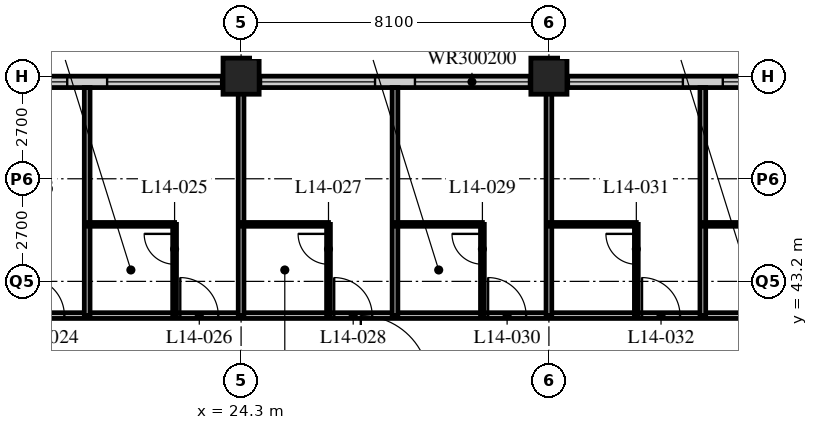
"""IFC4 building model, lengths in metres.
Left out: names, types, materials, properties, quantities, classifications, styles, units other than length and angle.
Written with IfcOpenShell. Run it as: python <this file> out.ifc"""

import sys

from ifc_helpers import new_model, si_unit, direction, frame, frame_2d, origin, origin_2d, place, context, subcontext, project, spatial, rectangle, hollow_rectangle, extrude, element, fill, save


model = new_model("IFC4")
c1 = context("Model", 3, precision=1e-05, world=origin(), true_north=direction((0.0, 1.0)))
c2 = subcontext(c1, "Body", "Model", "MODEL_VIEW")
j1 = project(units=[si_unit("LENGTHUNIT", "METRE"), si_unit("PLANEANGLEUNIT", "RADIAN")], contexts=[c1])
p1 = place(None, origin())
s1 = spatial("IfcSite", under=j1, at=p1, CompositionType="ELEMENT")
p2 = place(p1, origin())
s2 = spatial("IfcBuilding", under=s1, at=p2, CompositionType="ELEMENT")
p3 = place(p2, frame((0.0, 0.0, 60.2)))
s3 = spatial("IfcBuildingStorey", under=s2, at=p3, CompositionType="ELEMENT", Elevation=60.2)
for number, where, z_axis, x_axis in (
    (1, (24.3, 48.6, 0.0), (0.0, 0.0, 1.0), (1.0, 0.0, 0.0)),
    (2, (32.4, 48.6, 0.0), (0.0, 0.0, 1.0), (1.0, 0.0, 0.0)),
):
    element("IfcColumn", number, at=place(p3, frame(where, z_axis=z_axis, x_axis=x_axis)), inside=s3, PredefinedType="COLUMN", context=c2, shape_type="SweptSolid", body=[
        extrude(hollow_rectangle(XDim=0.95, YDim=0.95, WallThickness=0.095, at=origin_2d()), origin(), (0.0, 0.0, 1.0), 3.4),
    ])
p4 = place(p3, frame((48.3, 48.45, 0.0), z_axis=(0.0, 0.0, 1.0), x_axis=(-1.0, 0.0, 0.0)))
e3 = element("IfcWall", 3, at=p4, inside=s3, PredefinedType="SOLIDWALL", context=c2, shape_type="SweptSolid", body=[
    extrude(rectangle(XDim=40.2, YDim=0.3, at=frame_2d((20.1, 0.0))), origin(), (0.0, 0.0, 1.0), 3.19),
])
p5 = place(p4, frame((0.225, 0.0, 0.9)))
e4 = element("IfcOpeningElement", 4, at=p5, cuts=e3, PredefinedType="OPENING", context=c2, shape_type="SweptSolid", body=[
    extrude(rectangle(XDim=3.0, YDim=2.0, at=frame_2d((1.5, 1.0))), frame((0.0, 0.16, 0.0), z_axis=(0.0, -1.0, 0.0), x_axis=(1.0, 0.0, 0.0)), (0.0, 0.0, 1.0), 0.32),
])
p6 = place(p4, frame((4.275, 0.0, 0.9)))
e5 = element("IfcOpeningElement", 5, at=p6, cuts=e3, PredefinedType="OPENING", context=c2, shape_type="SweptSolid", body=[
    extrude(rectangle(XDim=3.0, YDim=2.0, at=frame_2d((1.5, 1.0))), frame((0.0, 0.16, 0.0), z_axis=(0.0, -1.0, 0.0), x_axis=(1.0, 0.0, 0.0)), (0.0, 0.0, 1.0), 0.32),
])
p7 = place(p4, frame((8.325, 0.0, 0.9)))
e6 = element("IfcOpeningElement", 6, at=p7, cuts=e3, PredefinedType="OPENING", context=c2, shape_type="SweptSolid", body=[
    extrude(rectangle(XDim=3.0, YDim=2.0, at=frame_2d((1.5, 1.0))), frame((0.0, 0.16, 0.0), z_axis=(0.0, -1.0, 0.0), x_axis=(1.0, 0.0, 0.0)), (0.0, 0.0, 1.0), 0.32),
])
p8 = place(p4, frame((12.375, 0.0, 0.9)))
e7 = element("IfcOpeningElement", 7, at=p8, cuts=e3, PredefinedType="OPENING", context=c2, shape_type="SweptSolid", body=[
    extrude(rectangle(XDim=3.0, YDim=2.0, at=frame_2d((1.5, 1.0))), frame((0.0, 0.16, 0.0), z_axis=(0.0, -1.0, 0.0), x_axis=(1.0, 0.0, 0.0)), (0.0, 0.0, 1.0), 0.32),
])
p9 = place(p4, frame((16.425, 0.0, 0.9)))
e8 = element("IfcOpeningElement", 8, at=p9, cuts=e3, PredefinedType="OPENING", context=c2, shape_type="SweptSolid", body=[
    extrude(rectangle(XDim=3.0, YDim=2.0, at=frame_2d((1.5, 1.0))), frame((0.0, 0.16, 0.0), z_axis=(0.0, -1.0, 0.0), x_axis=(1.0, 0.0, 0.0)), (0.0, 0.0, 1.0), 0.32),
])
p10 = place(p4, frame((20.475, 0.0, 0.9)))
e9 = element("IfcOpeningElement", 9, at=p10, cuts=e3, PredefinedType="OPENING", context=c2, shape_type="SweptSolid", body=[
    extrude(rectangle(XDim=3.0, YDim=2.0, at=frame_2d((1.5, 1.0))), frame((0.0, 0.16, 0.0), z_axis=(0.0, -1.0, 0.0), x_axis=(1.0, 0.0, 0.0)), (0.0, 0.0, 1.0), 0.32),
])
p11 = place(p4, frame((24.525, 0.0, 0.9)))
e10 = element("IfcOpeningElement", 10, at=p11, cuts=e3, PredefinedType="OPENING", context=c2, shape_type="SweptSolid", body=[
    extrude(rectangle(XDim=3.0, YDim=2.0, at=frame_2d((1.5, 1.0))), frame((0.0, 0.16, 0.0), z_axis=(0.0, -1.0, 0.0), x_axis=(1.0, 0.0, 0.0)), (0.0, 0.0, 1.0), 0.32),
])
p12 = place(p4, frame((28.575, 0.0, 0.9)))
e11 = element("IfcOpeningElement", 11, at=p12, cuts=e3, PredefinedType="OPENING", context=c2, shape_type="SweptSolid", body=[
    extrude(rectangle(XDim=3.0, YDim=2.0, at=frame_2d((1.5, 1.0))), frame((0.0, 0.16, 0.0), z_axis=(0.0, -1.0, 0.0), x_axis=(1.0, 0.0, 0.0)), (0.0, 0.0, 1.0), 0.32),
])
p13 = place(p4, frame((32.625, 0.0, 0.9)))
e12 = element("IfcOpeningElement", 12, at=p13, cuts=e3, PredefinedType="OPENING", context=c2, shape_type="SweptSolid", body=[
    extrude(rectangle(XDim=3.0, YDim=2.0, at=frame_2d((1.5, 1.0))), frame((0.0, 0.16, 0.0), z_axis=(0.0, -1.0, 0.0), x_axis=(1.0, 0.0, 0.0)), (0.0, 0.0, 1.0), 0.32),
])
p14 = place(p4, frame((36.675, 0.0, 0.9)))
e13 = element("IfcOpeningElement", 13, at=p14, cuts=e3, PredefinedType="OPENING", context=c2, shape_type="SweptSolid", body=[
    extrude(rectangle(XDim=3.0, YDim=2.0, at=frame_2d((1.5, 1.0))), frame((0.0, 0.16, 0.0), z_axis=(0.0, -1.0, 0.0), x_axis=(1.0, 0.0, 0.0)), (0.0, 0.0, 1.0), 0.32),
])
p15 = place(p3, frame((12.15, 42.3, 0.0), z_axis=(0.0, 0.0, 1.0), x_axis=(1.0, 0.0, 0.0)))
e14 = element("IfcWall", 14, at=p15, inside=s3, PredefinedType="PARTITIONING", context=c2, shape_type="SweptSolid", body=[
    extrude(rectangle(XDim=32.4, YDim=0.15, at=frame_2d((16.2, 0.0))), origin(), (0.0, 0.0, 1.0), 3.19),
])
p16 = place(p15, frame((6.5, 0.0, 0.0)))
e15 = element("IfcOpeningElement", 15, at=p16, cuts=e14, PredefinedType="OPENING", context=c2, shape_type="SweptSolid", body=[
    extrude(rectangle(XDim=1.0, YDim=2.1, at=frame_2d((0.5, 1.05))), frame((0.0, 0.085, 0.0), z_axis=(0.0, -1.0, 0.0), x_axis=(1.0, 0.0, 0.0)), (0.0, 0.0, 1.0), 0.17),
])
p17 = place(p15, frame((10.55, 0.0, 0.0)))
e16 = element("IfcOpeningElement", 16, at=p17, cuts=e14, PredefinedType="OPENING", context=c2, shape_type="SweptSolid", body=[
    extrude(rectangle(XDim=1.0, YDim=2.1, at=frame_2d((0.5, 1.05))), frame((0.0, 0.085, 0.0), z_axis=(0.0, -1.0, 0.0), x_axis=(1.0, 0.0, 0.0)), (0.0, 0.0, 1.0), 0.17),
])
p18 = place(p15, frame((14.6, 0.0, 0.0)))
e17 = element("IfcOpeningElement", 17, at=p18, cuts=e14, PredefinedType="OPENING", context=c2, shape_type="SweptSolid", body=[
    extrude(rectangle(XDim=1.0, YDim=2.1, at=frame_2d((0.5, 1.05))), frame((0.0, 0.085, 0.0), z_axis=(0.0, -1.0, 0.0), x_axis=(1.0, 0.0, 0.0)), (0.0, 0.0, 1.0), 0.17),
])
p19 = place(p15, frame((18.65, 0.0, 0.0)))
e18 = element("IfcOpeningElement", 18, at=p19, cuts=e14, PredefinedType="OPENING", context=c2, shape_type="SweptSolid", body=[
    extrude(rectangle(XDim=1.0, YDim=2.1, at=frame_2d((0.5, 1.05))), frame((0.0, 0.085, 0.0), z_axis=(0.0, -1.0, 0.0), x_axis=(1.0, 0.0, 0.0)), (0.0, 0.0, 1.0), 0.17),
])
p20 = place(p15, frame((22.7, 0.0, 0.0)))
e19 = element("IfcOpeningElement", 19, at=p20, cuts=e14, PredefinedType="OPENING", context=c2, shape_type="SweptSolid", body=[
    extrude(rectangle(XDim=1.0, YDim=2.1, at=frame_2d((0.5, 1.05))), frame((0.0, 0.085, 0.0), z_axis=(0.0, -1.0, 0.0), x_axis=(1.0, 0.0, 0.0)), (0.0, 0.0, 1.0), 0.17),
])
p21 = place(p15, frame((26.75, 0.0, 0.0)))
e20 = element("IfcOpeningElement", 20, at=p21, cuts=e14, PredefinedType="OPENING", context=c2, shape_type="SweptSolid", body=[
    extrude(rectangle(XDim=1.0, YDim=2.1, at=frame_2d((0.5, 1.05))), frame((0.0, 0.085, 0.0), z_axis=(0.0, -1.0, 0.0), x_axis=(1.0, 0.0, 0.0)), (0.0, 0.0, 1.0), 0.17),
])
p22 = place(p15, frame((28.775, 0.0, 0.0)))
e21 = element("IfcOpeningElement", 21, at=p22, cuts=e14, PredefinedType="OPENING", context=c2, shape_type="SweptSolid", body=[
    extrude(rectangle(XDim=1.0, YDim=2.1, at=frame_2d((0.5, 1.05))), frame((0.0, 0.085, 0.0), z_axis=(0.0, -1.0, 0.0), x_axis=(1.0, 0.0, 0.0)), (0.0, 0.0, 1.0), 0.17),
])
p23 = place(p15, frame((2.625, 0.0, 0.0)))
e22 = element("IfcOpeningElement", 22, at=p23, cuts=e14, PredefinedType="OPENING", context=c2, shape_type="SweptSolid", body=[
    extrude(rectangle(XDim=1.0, YDim=2.1, at=frame_2d((0.5, 1.05))), frame((0.0, 0.085, 0.0), z_axis=(0.0, -1.0, 0.0), x_axis=(1.0, 0.0, 0.0)), (0.0, 0.0, 1.0), 0.17),
])
p24 = place(p3, frame((20.25, 42.3, 0.0), z_axis=(0.0, 0.0, 1.0), x_axis=(0.0, 1.0, 0.0)))
e23 = element("IfcWall", 23, at=p24, inside=s3, PredefinedType="PARTITIONING", context=c2, shape_type="SweptSolid", body=[
    extrude(rectangle(XDim=6.0, YDim=0.15, at=frame_2d((3.0, 0.0))), origin(), (0.0, 0.0, 1.0), 3.19),
])
p25 = place(p3, frame((20.25, 44.7, 0.0), z_axis=(0.0, 0.0, 1.0), x_axis=(1.0, 0.0, 0.0)))
e24 = element("IfcWall", 24, at=p25, inside=s3, PredefinedType="PARTITIONING", context=c2, shape_type="SweptSolid", body=[
    extrude(rectangle(XDim=2.3, YDim=0.1, at=frame_2d((1.15, 0.0))), origin(), (0.0, 0.0, 1.0), 3.19),
])
p26 = place(p3, frame((22.55, 42.3, 0.0), z_axis=(0.0, 0.0, 1.0), x_axis=(0.0, 1.0, 0.0)))
e25 = element("IfcWall", 25, at=p26, inside=s3, PredefinedType="PARTITIONING", context=c2, shape_type="SweptSolid", body=[
    extrude(rectangle(XDim=2.4, YDim=0.1, at=frame_2d((1.2, 0.0))), origin(), (0.0, 0.0, 1.0), 3.19),
])
p27 = place(p26, frame((1.35, 0.0, 0.0)))
e26 = element("IfcOpeningElement", 26, at=p27, cuts=e25, PredefinedType="OPENING", context=c2, shape_type="SweptSolid", body=[
    extrude(rectangle(XDim=0.8, YDim=2.1, at=frame_2d((0.4, 1.05))), frame((0.0, 0.06, 0.0), z_axis=(0.0, -1.0, 0.0), x_axis=(1.0, 0.0, 0.0)), (0.0, 0.0, 1.0), 0.12),
])
p28 = place(p3, frame((24.3, 42.3, 0.0), z_axis=(0.0, 0.0, 1.0), x_axis=(0.0, 1.0, 0.0)))
e27 = element("IfcWall", 27, at=p28, inside=s3, PredefinedType="PARTITIONING", context=c2, shape_type="SweptSolid", body=[
    extrude(rectangle(XDim=6.0, YDim=0.15, at=frame_2d((3.0, 0.0))), origin(), (0.0, 0.0, 1.0), 2.578),
])
p29 = place(p3, frame((24.3, 44.7, 0.0), z_axis=(0.0, 0.0, 1.0), x_axis=(1.0, 0.0, 0.0)))
e28 = element("IfcWall", 28, at=p29, inside=s3, PredefinedType="PARTITIONING", context=c2, shape_type="SweptSolid", body=[
    extrude(rectangle(XDim=2.3, YDim=0.1, at=frame_2d((1.15, 0.0))), origin(), (0.0, 0.0, 1.0), 3.19),
])
p30 = place(p3, frame((26.6, 42.3, 0.0), z_axis=(0.0, 0.0, 1.0), x_axis=(0.0, 1.0, 0.0)))
e29 = element("IfcWall", 29, at=p30, inside=s3, PredefinedType="PARTITIONING", context=c2, shape_type="SweptSolid", body=[
    extrude(rectangle(XDim=2.4, YDim=0.1, at=frame_2d((1.2, 0.0))), origin(), (0.0, 0.0, 1.0), 3.19),
])
p31 = place(p30, frame((1.35, 0.0, 0.0)))
e30 = element("IfcOpeningElement", 30, at=p31, cuts=e29, PredefinedType="OPENING", context=c2, shape_type="SweptSolid", body=[
    extrude(rectangle(XDim=0.8, YDim=2.1, at=frame_2d((0.4, 1.05))), frame((0.0, 0.06, 0.0), z_axis=(0.0, -1.0, 0.0), x_axis=(1.0, 0.0, 0.0)), (0.0, 0.0, 1.0), 0.12),
])
p32 = place(p3, frame((28.35, 42.3, 0.0), z_axis=(0.0, 0.0, 1.0), x_axis=(0.0, 1.0, 0.0)))
e31 = element("IfcWall", 31, at=p32, inside=s3, PredefinedType="PARTITIONING", context=c2, shape_type="SweptSolid", body=[
    extrude(rectangle(XDim=6.0, YDim=0.15, at=frame_2d((3.0, 0.0))), origin(), (0.0, 0.0, 1.0), 3.19),
])
p33 = place(p3, frame((28.35, 44.7, 0.0), z_axis=(0.0, 0.0, 1.0), x_axis=(1.0, 0.0, 0.0)))
e32 = element("IfcWall", 32, at=p33, inside=s3, PredefinedType="PARTITIONING", context=c2, shape_type="SweptSolid", body=[
    extrude(rectangle(XDim=2.3, YDim=0.1, at=frame_2d((1.15, 0.0))), origin(), (0.0, 0.0, 1.0), 3.19),
])
p34 = place(p3, frame((30.65, 42.3, 0.0), z_axis=(0.0, 0.0, 1.0), x_axis=(0.0, 1.0, 0.0)))
e33 = element("IfcWall", 33, at=p34, inside=s3, PredefinedType="PARTITIONING", context=c2, shape_type="SweptSolid", body=[
    extrude(rectangle(XDim=2.4, YDim=0.1, at=frame_2d((1.2, 0.0))), origin(), (0.0, 0.0, 1.0), 3.19),
])
p35 = place(p34, frame((1.35, 0.0, 0.0)))
e34 = element("IfcOpeningElement", 34, at=p35, cuts=e33, PredefinedType="OPENING", context=c2, shape_type="SweptSolid", body=[
    extrude(rectangle(XDim=0.8, YDim=2.1, at=frame_2d((0.4, 1.05))), frame((0.0, 0.06, 0.0), z_axis=(0.0, -1.0, 0.0), x_axis=(1.0, 0.0, 0.0)), (0.0, 0.0, 1.0), 0.12),
])
p36 = place(p3, frame((32.4, 42.3, 0.0), z_axis=(0.0, 0.0, 1.0), x_axis=(0.0, 1.0, 0.0)))
e35 = element("IfcWall", 35, at=p36, inside=s3, PredefinedType="PARTITIONING", context=c2, shape_type="SweptSolid", body=[
    extrude(rectangle(XDim=6.0, YDim=0.15, at=frame_2d((3.0, 0.0))), origin(), (0.0, 0.0, 1.0), 2.578),
])
p37 = place(p3, frame((32.4, 44.7, 0.0), z_axis=(0.0, 0.0, 1.0), x_axis=(1.0, 0.0, 0.0)))
e36 = element("IfcWall", 36, at=p37, inside=s3, PredefinedType="PARTITIONING", context=c2, shape_type="SweptSolid", body=[
    extrude(rectangle(XDim=2.3, YDim=0.1, at=frame_2d((1.15, 0.0))), origin(), (0.0, 0.0, 1.0), 3.19),
])
p38 = place(p3, frame((34.7, 42.3, 0.0), z_axis=(0.0, 0.0, 1.0), x_axis=(0.0, 1.0, 0.0)))
e37 = element("IfcWall", 37, at=p38, inside=s3, PredefinedType="PARTITIONING", context=c2, shape_type="SweptSolid", body=[
    extrude(rectangle(XDim=2.4, YDim=0.1, at=frame_2d((1.2, 0.0))), origin(), (0.0, 0.0, 1.0), 3.19),
])
p39 = place(p38, frame((1.35, 0.0, 0.0)))
e38 = element("IfcOpeningElement", 38, at=p39, cuts=e37, PredefinedType="OPENING", context=c2, shape_type="SweptSolid", body=[
    extrude(rectangle(XDim=0.8, YDim=2.1, at=frame_2d((0.4, 1.05))), frame((0.0, 0.06, 0.0), z_axis=(0.0, -1.0, 0.0), x_axis=(1.0, 0.0, 0.0)), (0.0, 0.0, 1.0), 0.12),
])
p40 = place(p3, frame((36.45, 42.3, 0.0), z_axis=(0.0, 0.0, 1.0), x_axis=(0.0, 1.0, 0.0)))
e39 = element("IfcWall", 39, at=p40, inside=s3, PredefinedType="PARTITIONING", context=c2, shape_type="SweptSolid", body=[
    extrude(rectangle(XDim=6.0, YDim=0.15, at=frame_2d((3.0, 0.0))), origin(), (0.0, 0.0, 1.0), 3.19),
])
p41 = place(p3, frame((36.45, 44.7, 0.0), z_axis=(0.0, 0.0, 1.0), x_axis=(1.0, 0.0, 0.0)))
e40 = element("IfcWall", 40, at=p41, inside=s3, PredefinedType="PARTITIONING", context=c2, shape_type="SweptSolid", body=[
    extrude(rectangle(XDim=2.3, YDim=0.1, at=frame_2d((1.15, 0.0))), origin(), (0.0, 0.0, 1.0), 3.19),
])
p42 = place(p7, origin())
e41 = element("IfcWindow", 41, at=p42, inside=s3, PartitioningType="SINGLE_PANEL", PredefinedType="WINDOW", context=c2, shape_type="SweptSolid", body=[
    extrude(rectangle(XDim=3.0, YDim=2.0, at=frame_2d((1.5, 1.0))), frame((0.0, 0.03, 0.0), z_axis=(0.0, -1.0, 0.0), x_axis=(1.0, 0.0, 0.0)), (0.0, 0.0, 1.0), 0.06),
])
fill(e6, e41)
p43 = place(p8, origin())
e42 = element("IfcWindow", 42, at=p43, inside=s3, PartitioningType="SINGLE_PANEL", PredefinedType="WINDOW", context=c2, shape_type="SweptSolid", body=[
    extrude(rectangle(XDim=3.0, YDim=2.0, at=frame_2d((1.5, 1.0))), frame((0.0, 0.03, 0.0), z_axis=(0.0, -1.0, 0.0), x_axis=(1.0, 0.0, 0.0)), (0.0, 0.0, 1.0), 0.06),
])
fill(e7, e42)
p44 = place(p9, origin())
e43 = element("IfcWindow", 43, at=p44, inside=s3, PartitioningType="SINGLE_PANEL", PredefinedType="WINDOW", context=c2, shape_type="SweptSolid", body=[
    extrude(rectangle(XDim=3.0, YDim=2.0, at=frame_2d((1.5, 1.0))), frame((0.0, 0.03, 0.0), z_axis=(0.0, -1.0, 0.0), x_axis=(1.0, 0.0, 0.0)), (0.0, 0.0, 1.0), 0.06),
])
fill(e8, e43)
p45 = place(p10, origin())
e44 = element("IfcWindow", 44, at=p45, inside=s3, PartitioningType="SINGLE_PANEL", PredefinedType="WINDOW", context=c2, shape_type="SweptSolid", body=[
    extrude(rectangle(XDim=3.0, YDim=2.0, at=frame_2d((1.5, 1.0))), frame((0.0, 0.03, 0.0), z_axis=(0.0, -1.0, 0.0), x_axis=(1.0, 0.0, 0.0)), (0.0, 0.0, 1.0), 0.06),
])
fill(e9, e44)
p46 = place(p11, origin())
e45 = element("IfcWindow", 45, at=p46, inside=s3, PartitioningType="SINGLE_PANEL", PredefinedType="WINDOW", context=c2, shape_type="SweptSolid", body=[
    extrude(rectangle(XDim=3.0, YDim=2.0, at=frame_2d((1.5, 1.0))), frame((0.0, 0.03, 0.0), z_axis=(0.0, -1.0, 0.0), x_axis=(1.0, 0.0, 0.0)), (0.0, 0.0, 1.0), 0.06),
])
fill(e10, e45)
p47 = place(p12, origin())
e46 = element("IfcWindow", 46, at=p47, inside=s3, PartitioningType="SINGLE_PANEL", PredefinedType="WINDOW", context=c2, shape_type="SweptSolid", body=[
    extrude(rectangle(XDim=3.0, YDim=2.0, at=frame_2d((1.5, 1.0))), frame((0.0, 0.03, 0.0), z_axis=(0.0, -1.0, 0.0), x_axis=(1.0, 0.0, 0.0)), (0.0, 0.0, 1.0), 0.06),
])
fill(e11, e46)
p48 = place(p16, origin())
e47 = element("IfcDoor", 47, at=p48, inside=s3, OperationType="SINGLE_SWING_LEFT", PredefinedType="DOOR", context=c2, shape_type="SweptSolid", body=[
    extrude(rectangle(XDim=1.0, YDim=2.1, at=frame_2d((0.5, 1.05))), frame((0.0, 0.025, 0.0), z_axis=(0.0, -1.0, 0.0), x_axis=(1.0, 0.0, 0.0)), (0.0, 0.0, 1.0), 0.05),
])
fill(e15, e47)
p49 = place(p27, origin())
e48 = element("IfcDoor", 48, at=p49, inside=s3, OperationType="SINGLE_SWING_RIGHT", PredefinedType="DOOR", context=c2, shape_type="SweptSolid", body=[
    extrude(rectangle(XDim=0.8, YDim=2.1, at=frame_2d((0.4, 1.05))), frame((0.0, 0.025, 0.0), z_axis=(0.0, -1.0, 0.0), x_axis=(1.0, 0.0, 0.0)), (0.0, 0.0, 1.0), 0.05),
])
fill(e26, e48)
p50 = place(p17, origin())
e49 = element("IfcDoor", 49, at=p50, inside=s3, OperationType="SINGLE_SWING_LEFT", PredefinedType="DOOR", context=c2, shape_type="SweptSolid", body=[
    extrude(rectangle(XDim=1.0, YDim=2.1, at=frame_2d((0.5, 1.05))), frame((0.0, 0.025, 0.0), z_axis=(0.0, -1.0, 0.0), x_axis=(1.0, 0.0, 0.0)), (0.0, 0.0, 1.0), 0.05),
])
fill(e16, e49)
p51 = place(p31, origin())
e50 = element("IfcDoor", 50, at=p51, inside=s3, OperationType="SINGLE_SWING_RIGHT", PredefinedType="DOOR", context=c2, shape_type="SweptSolid", body=[
    extrude(rectangle(XDim=0.8, YDim=2.1, at=frame_2d((0.4, 1.05))), frame((0.0, 0.025, 0.0), z_axis=(0.0, -1.0, 0.0), x_axis=(1.0, 0.0, 0.0)), (0.0, 0.0, 1.0), 0.05),
])
fill(e30, e50)
p52 = place(p18, origin())
e51 = element("IfcDoor", 51, at=p52, inside=s3, OperationType="SINGLE_SWING_LEFT", PredefinedType="DOOR", context=c2, shape_type="SweptSolid", body=[
    extrude(rectangle(XDim=1.0, YDim=2.1, at=frame_2d((0.5, 1.05))), frame((0.0, 0.025, 0.0), z_axis=(0.0, -1.0, 0.0), x_axis=(1.0, 0.0, 0.0)), (0.0, 0.0, 1.0), 0.05),
])
fill(e17, e51)
p53 = place(p35, origin())
e52 = element("IfcDoor", 52, at=p53, inside=s3, OperationType="SINGLE_SWING_RIGHT", PredefinedType="DOOR", context=c2, shape_type="SweptSolid", body=[
    extrude(rectangle(XDim=0.8, YDim=2.1, at=frame_2d((0.4, 1.05))), frame((0.0, 0.025, 0.0), z_axis=(0.0, -1.0, 0.0), x_axis=(1.0, 0.0, 0.0)), (0.0, 0.0, 1.0), 0.05),
])
fill(e34, e52)
p54 = place(p19, origin())
e53 = element("IfcDoor", 53, at=p54, inside=s3, OperationType="SINGLE_SWING_LEFT", PredefinedType="DOOR", context=c2, shape_type="SweptSolid", body=[
    extrude(rectangle(XDim=1.0, YDim=2.1, at=frame_2d((0.5, 1.05))), frame((0.0, 0.025, 0.0), z_axis=(0.0, -1.0, 0.0), x_axis=(1.0, 0.0, 0.0)), (0.0, 0.0, 1.0), 0.05),
])
fill(e18, e53)
p55 = place(p39, origin())
e54 = element("IfcDoor", 54, at=p55, inside=s3, OperationType="SINGLE_SWING_RIGHT", PredefinedType="DOOR", context=c2, shape_type="SweptSolid", body=[
    extrude(rectangle(XDim=0.8, YDim=2.1, at=frame_2d((0.4, 1.05))), frame((0.0, 0.025, 0.0), z_axis=(0.0, -1.0, 0.0), x_axis=(1.0, 0.0, 0.0)), (0.0, 0.0, 1.0), 0.05),
])
fill(e38, e54)
p56 = place(p20, origin())
e55 = element("IfcDoor", 55, at=p56, inside=s3, OperationType="SINGLE_SWING_LEFT", PredefinedType="DOOR", context=c2, shape_type="SweptSolid", body=[
    extrude(rectangle(XDim=1.0, YDim=2.1, at=frame_2d((0.5, 1.05))), frame((0.0, 0.025, 0.0), z_axis=(0.0, -1.0, 0.0), x_axis=(1.0, 0.0, 0.0)), (0.0, 0.0, 1.0), 0.05),
])
fill(e19, e55)
save(model, sys.argv[1])
